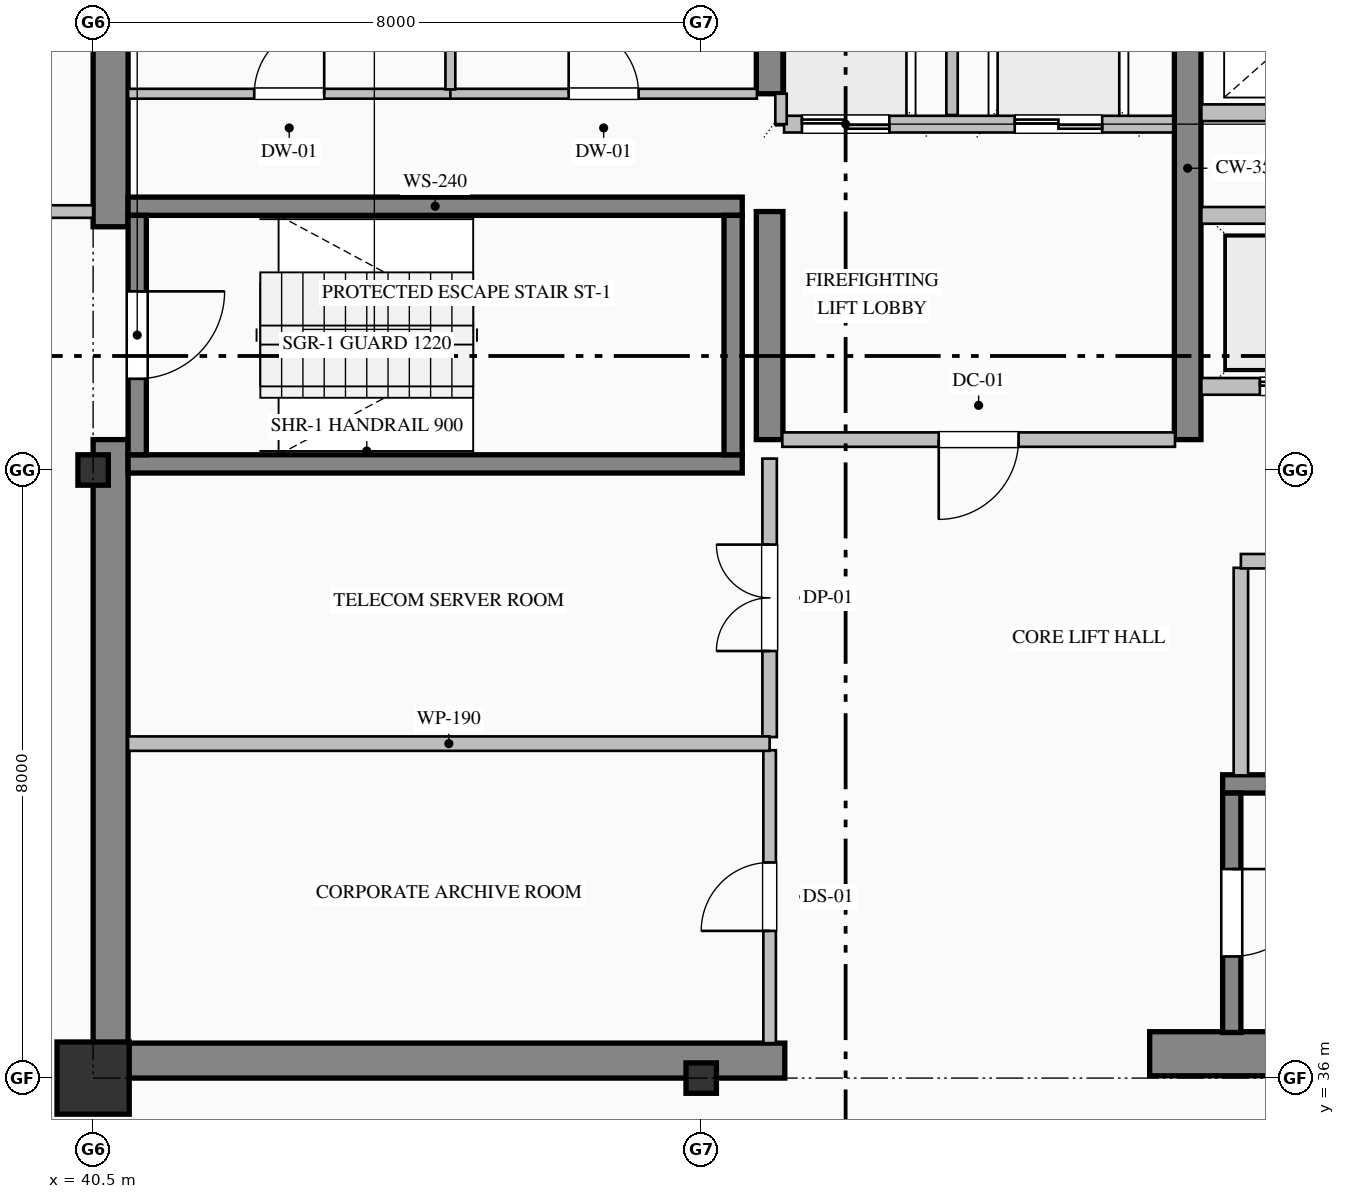
"""IFC4 building model, lengths in metres.
Left out: names, types, materials, properties, quantities, classifications, styles, units other than length and angle.
Written with IfcOpenShell. Run it as: python <this file> out.ifc"""

import sys

from ifc_helpers import new_model, si_unit, direction, frame, frame_2d, origin, origin_2d, place, context, subcontext, project, spatial, rectangle, hollow_rectangle, i_section, extrude, element, fill, save


model = new_model("IFC4")
c1 = context("Model", 3, precision=1e-05, world=origin(), true_north=direction((0.0, 1.0)))
c2 = subcontext(c1, "Body", "Model", "MODEL_VIEW")
j1 = project(units=[si_unit("LENGTHUNIT", "METRE"), si_unit("PLANEANGLEUNIT", "RADIAN")], contexts=[c1])
p1 = place(None, origin())
s1 = spatial("IfcSite", under=j1, at=p1, CompositionType="ELEMENT")
p2 = place(p1, origin())
s2 = spatial("IfcBuilding", under=s1, at=p2, CompositionType="ELEMENT")
p3 = place(p2, frame((0.0, 0.0, 249.8)))
s3 = spatial("IfcBuildingStorey", under=s2, at=p3, CompositionType="ELEMENT", Elevation=249.8)
p4 = place(p3, frame((40.73, 36.46, 0.0), z_axis=(0.0, 0.0, 1.0), x_axis=(0.0, 1.0, 0.0)))
e1 = element("IfcWall", 1, at=p4, inside=s3, PredefinedType="SHEAR", context=c2, shape_type="SweptSolid", body=[
    extrude(rectangle(XDim=7.94, YDim=0.46, at=frame_2d((3.97, 0.0))), origin(), (0.0, 0.0, 1.0), 3.775),
])
p5 = place(p3, frame((40.73, 47.2, 0.0), z_axis=(0.0, 0.0, 1.0), x_axis=(0.0, 1.0, 0.0)))
e2 = element("IfcWall", 2, at=p5, inside=s3, PredefinedType="SHEAR", context=c2, shape_type="SweptSolid", body=[
    extrude(rectangle(XDim=4.34, YDim=0.46, at=frame_2d((2.17, 0.0))), origin(), (0.0, 0.0, 1.0), 3.775),
])
p6 = place(p3, frame((40.5, 36.23, 0.0), z_axis=(0.0, 0.0, 1.0), x_axis=(1.0, 0.0, 0.0)))
e3 = element("IfcWall", 3, at=p6, inside=s3, PredefinedType="SHEAR", context=c2, shape_type="SweptSolid", body=[
    extrude(rectangle(XDim=9.1, YDim=0.46, at=frame_2d((4.55, 0.0))), origin(), (0.0, 0.0, 1.0), 3.775),
])
p7 = place(p3, frame((54.4, 36.32, 0.0), z_axis=(0.0, 0.0, 1.0), x_axis=(1.0, 0.0, 0.0)))
e4 = element("IfcWall", 4, at=p7, inside=s3, PredefinedType="SHEAR", context=c2, shape_type="SweptSolid", body=[
    extrude(rectangle(XDim=9.6, YDim=0.58, at=frame_2d((4.8, 0.0))), origin(), (0.0, 0.0, 1.0), 4.0),
])
p8 = place(p3, frame((49.4, 44.4, 0.0), z_axis=(0.0, 0.0, 1.0), x_axis=(0.0, 1.0, 0.0)))
e5 = element("IfcWall", 5, at=p8, inside=s3, PredefinedType="SHEAR", context=c2, shape_type="SweptSolid", body=[
    extrude(rectangle(XDim=3.0, YDim=0.35, at=frame_2d((1.5, 0.0))), origin(), (0.0, 0.0, 1.0), 3.775),
])
p9 = place(p3, frame((49.4, 48.95, 0.0), z_axis=(0.0, 0.0, 1.0), x_axis=(0.0, 1.0, 0.0)))
e6 = element("IfcWall", 6, at=p9, inside=s3, PredefinedType="SHEAR", context=c2, shape_type="SweptSolid", body=[
    extrude(rectangle(XDim=2.59, YDim=0.35, at=frame_2d((1.295, 0.0))), origin(), (0.0, 0.0, 1.0), 3.775),
])
p10 = place(p3, frame((54.9, 44.4, 0.0), z_axis=(0.0, 0.0, 1.0), x_axis=(0.0, 1.0, 0.0)))
e7 = element("IfcWall", 7, at=p10, inside=s3, PredefinedType="SHEAR", context=c2, shape_type="SweptSolid", body=[
    extrude(rectangle(XDim=7.14, YDim=0.35, at=frame_2d((3.57, 0.0))), origin(), (0.0, 0.0, 1.0), 3.775),
])
p11 = place(p3, frame((40.5, 36.0, 0.0), z_axis=(0.0, 0.0, 1.0), x_axis=(1.0, 0.0, 0.0)))
e8 = element("IfcColumn", 8, at=p11, inside=s3, PredefinedType="COLUMN", context=c2, shape_type="SweptSolid", body=[
    extrude(hollow_rectangle(XDim=0.95, YDim=0.95, WallThickness=0.036, at=origin_2d()), origin(), (0.0, 0.0, 1.0), 4.0),
])
for number, where, z_axis, x_axis in (
    (9, (40.5, 44.0, 0.0), (0.0, 0.0, 1.0), (1.0, 0.0, 0.0)),
    (10, (48.5, 36.0, 0.0), (0.0, 0.0, 1.0), (1.0, 0.0, 0.0)),
):
    element("IfcColumn", number, at=place(p3, frame(where, z_axis=z_axis, x_axis=x_axis)), inside=s3, PredefinedType="COLUMN", context=c2, shape_type="SweptSolid", body=[
        extrude(i_section(OverallWidth=0.4, OverallDepth=0.4, WebThickness=0.013, FlangeThickness=0.021, FilletRadius=0.022, at=origin_2d()), origin(), (0.0, 0.0, 1.0), 4.0),
    ])
for number, where, z_axis, x_axis in (
    (11, (40.96, 47.47, 0.0), (0.0, 0.0, 1.0), (1.0, 0.0, 0.0)),
    (12, (49.04, 44.08, 0.0), (0.0, 0.0, 1.0), (-1.0, 0.0, 0.0)),
):
    element("IfcWall", number, at=place(p3, frame(where, z_axis=z_axis, x_axis=x_axis)), inside=s3, PredefinedType="SOLIDWALL", context=c2, shape_type="SweptSolid", body=[
        extrude(rectangle(XDim=8.08, YDim=0.24, at=frame_2d((4.04, 0.0))), origin(), (0.0, 0.0, 1.0), 4.0),
    ])
p12 = place(p3, frame((41.08, 47.35, 0.0), z_axis=(0.0, 0.0, 1.0), x_axis=(0.0, -1.0, 0.0)))
e13 = element("IfcWall", 13, at=p12, inside=s3, PredefinedType="SOLIDWALL", context=c2, shape_type="SweptSolid", body=[
    extrude(rectangle(XDim=3.15, YDim=0.24, at=frame_2d((1.575, 0.0))), origin(), (0.0, 0.0, 1.0), 4.0),
])
p13 = place(p12, frame((1.0, 0.0, 0.0)))
e14 = element("IfcOpeningElement", 14, at=p13, cuts=e13, PredefinedType="OPENING", context=c2, shape_type="SweptSolid", body=[
    extrude(rectangle(XDim=1.15, YDim=2.2, at=frame_2d((0.575, 1.1))), frame((0.0, 0.13, 0.0), z_axis=(0.0, -1.0, 0.0), x_axis=(1.0, 0.0, 0.0)), (0.0, 0.0, 1.0), 0.26),
])
p14 = place(p3, frame((48.92, 44.2, 0.0), z_axis=(0.0, 0.0, 1.0), x_axis=(0.0, 1.0, 0.0)))
e15 = element("IfcWall", 15, at=p14, inside=s3, PredefinedType="SOLIDWALL", context=c2, shape_type="SweptSolid", body=[
    extrude(rectangle(XDim=3.15, YDim=0.24, at=frame_2d((1.575, 0.0))), origin(), (0.0, 0.0, 1.0), 4.0),
])
p15 = place(p3, frame((55.36, 39.87, 0.0), z_axis=(0.0, 0.0, 1.0), x_axis=(1.0, 0.0, 0.0)))
e16 = element("IfcWall", 16, at=p15, inside=s3, PredefinedType="SOLIDWALL", context=c2, shape_type="SweptSolid", body=[
    extrude(rectangle(XDim=8.08, YDim=0.24, at=frame_2d((4.04, 0.0))), origin(), (0.0, 0.0, 1.0), 4.0),
])
p16 = place(p3, frame((55.48, 39.75, 0.0), z_axis=(0.0, 0.0, 1.0), x_axis=(0.0, -1.0, 0.0)))
e17 = element("IfcWall", 17, at=p16, inside=s3, PredefinedType="SOLIDWALL", context=c2, shape_type="SweptSolid", body=[
    extrude(rectangle(XDim=3.15, YDim=0.24, at=frame_2d((1.575, 0.0))), origin(), (0.0, 0.0, 1.0), 4.0),
])
p17 = place(p16, frame((1.0, 0.0, 0.0)))
e18 = element("IfcOpeningElement", 18, at=p17, cuts=e17, PredefinedType="OPENING", context=c2, shape_type="SweptSolid", body=[
    extrude(rectangle(XDim=1.15, YDim=2.2, at=frame_2d((0.575, 1.1))), frame((0.0, 0.13, 0.0), z_axis=(0.0, -1.0, 0.0), x_axis=(1.0, 0.0, 0.0)), (0.0, 0.0, 1.0), 0.26),
])
p18 = place(p3, frame((54.71, 48.55, 0.0), z_axis=(0.0, 0.0, 1.0), x_axis=(-1.0, 0.0, 0.0)))
e19 = element("IfcWall", 19, at=p18, inside=s3, PredefinedType="PARTITIONING", context=c2, shape_type="SweptSolid", body=[
    extrude(rectangle(XDim=5.12, YDim=0.22, at=frame_2d((2.56, 0.0))), origin(), (0.0, 0.0, 1.0), 3.775),
])
p19 = place(p18, frame((3.735, 0.0, 0.0)))
e20 = element("IfcOpeningElement", 20, at=p19, cuts=e19, PredefinedType="OPENING", context=c2, shape_type="SweptSolid", body=[
    extrude(rectangle(XDim=1.15, YDim=2.2, at=frame_2d((0.575, 1.1))), frame((0.0, 0.12, 0.0), z_axis=(0.0, -1.0, 0.0), x_axis=(1.0, 0.0, 0.0)), (0.0, 0.0, 1.0), 0.24),
])
p20 = place(p18, frame((0.935, 0.0, 0.0)))
e21 = element("IfcOpeningElement", 21, at=p20, cuts=e19, PredefinedType="OPENING", context=c2, shape_type="SweptSolid", body=[
    extrude(rectangle(XDim=1.15, YDim=2.2, at=frame_2d((0.575, 1.1))), frame((0.0, 0.12, 0.0), z_axis=(0.0, -1.0, 0.0), x_axis=(1.0, 0.0, 0.0)), (0.0, 0.0, 1.0), 0.24),
])
p21 = place(p3, frame((51.8, 48.67, 0.0), z_axis=(0.0, 0.0, 1.0), x_axis=(0.0, 1.0, 0.0)))
e22 = element("IfcWall", 22, at=p21, inside=s3, PredefinedType="PARTITIONING", context=c2, shape_type="SweptSolid", body=[
    extrude(rectangle(XDim=2.87, YDim=0.15, at=frame_2d((1.435, 0.0))), origin(), (0.0, 0.0, 1.0), 3.775),
])
p22 = place(p3, frame((49.55, 48.55, 0.0), z_axis=(0.0, 0.0, 1.0), x_axis=(0.0, 1.0, 0.0)))
e23 = element("IfcWall", 23, at=p22, inside=s3, PredefinedType="PARTITIONING", context=c2, shape_type="SweptSolid", body=[
    extrude(rectangle(XDim=0.4, YDim=0.15, at=frame_2d((0.2, 0.0))), origin(), (0.0, 0.0, 1.0), 3.775),
])
p23 = place(p3, frame((63.32, 45.1, 0.0), z_axis=(0.0, 0.0, 1.0), x_axis=(-1.0, 0.0, 0.0)))
e24 = element("IfcWall", 24, at=p23, inside=s3, PredefinedType="PARTITIONING", context=c2, shape_type="SweptSolid", body=[
    extrude(rectangle(XDim=8.24, YDim=0.22, at=frame_2d((4.12, 0.0))), origin(), (0.0, 0.0, 1.0), 3.775),
])
p24 = place(p23, frame((6.37, 0.0, 0.0)))
e25 = element("IfcOpeningElement", 25, at=p24, cuts=e24, PredefinedType="OPENING", context=c2, shape_type="SweptSolid", body=[
    extrude(rectangle(XDim=1.1, YDim=2.2, at=frame_2d((0.55, 1.1))), frame((0.0, 0.12, 0.0), z_axis=(0.0, -1.0, 0.0), x_axis=(1.0, 0.0, 0.0)), (0.0, 0.0, 1.0), 0.24),
])
p25 = place(p23, frame((3.57, 0.0, 0.0)))
e26 = element("IfcOpeningElement", 26, at=p25, cuts=e24, PredefinedType="OPENING", context=c2, shape_type="SweptSolid", body=[
    extrude(rectangle(XDim=1.1, YDim=2.2, at=frame_2d((0.55, 1.1))), frame((0.0, 0.12, 0.0), z_axis=(0.0, -1.0, 0.0), x_axis=(1.0, 0.0, 0.0)), (0.0, 0.0, 1.0), 0.24),
])
p26 = place(p23, frame((0.77, 0.0, 0.0)))
e27 = element("IfcOpeningElement", 27, at=p26, cuts=e24, PredefinedType="OPENING", context=c2, shape_type="SweptSolid", body=[
    extrude(rectangle(XDim=1.1, YDim=2.2, at=frame_2d((0.55, 1.1))), frame((0.0, 0.12, 0.0), z_axis=(0.0, -1.0, 0.0), x_axis=(1.0, 0.0, 0.0)), (0.0, 0.0, 1.0), 0.24),
])
for number, where, z_axis, x_axis in (
    (28, (55.08, 47.35, 0.0), (0.0, 0.0, 1.0), (1.0, 0.0, 0.0)),
    (29, (63.32, 48.7, 0.0), (0.0, 0.0, 1.0), (-1.0, 0.0, 0.0)),
):
    element("IfcWall", number, at=place(p3, frame(where, z_axis=z_axis, x_axis=x_axis)), inside=s3, PredefinedType="PARTITIONING", context=c2, shape_type="SweptSolid", body=[
        extrude(rectangle(XDim=8.24, YDim=0.22, at=frame_2d((4.12, 0.0))), origin(), (0.0, 0.0, 1.0), 3.775),
    ])
p27 = place(p3, frame((37.8, 47.4, 0.0), z_axis=(0.0, 0.0, 1.0), x_axis=(1.0, 0.0, 0.0)))
e30 = element("IfcWall", 30, at=p27, inside=s3, PredefinedType="PARTITIONING", context=c2, shape_type="SweptSolid", body=[
    extrude(rectangle(XDim=2.7, YDim=0.165, at=frame_2d((1.35, 0.0))), origin(), (0.0, 0.0, 1.0), 3.775),
])
p28 = place(p27, frame((0.825, 0.0, 0.0)))
e31 = element("IfcOpeningElement", 31, at=p28, cuts=e30, PredefinedType="OPENING", context=c2, shape_type="SweptSolid", body=[
    extrude(rectangle(XDim=1.05, YDim=2.15, at=frame_2d((0.525, 1.075))), frame((0.0, 0.093, 0.0), z_axis=(0.0, -1.0, 0.0), x_axis=(1.0, 0.0, 0.0)), (0.0, 0.0, 1.0), 0.185),
])
p29 = place(p3, frame((40.96, 48.95, 0.0), z_axis=(0.0, 0.0, 1.0), x_axis=(1.0, 0.0, 0.0)))
e32 = element("IfcWall", 32, at=p29, inside=s3, PredefinedType="PARTITIONING", context=c2, shape_type="SweptSolid", body=[
    extrude(rectangle(XDim=4.24, YDim=0.13, at=frame_2d((2.12, 0.0))), origin(), (0.0, 0.0, 1.0), 3.775),
])
p30 = place(p29, frame((1.66, 0.0, 0.0)))
e33 = element("IfcOpeningElement", 33, at=p30, cuts=e32, PredefinedType="OPENING", context=c2, shape_type="SweptSolid", body=[
    extrude(rectangle(XDim=0.92, YDim=2.15, at=frame_2d((0.46, 1.075))), frame((0.0, 0.075, 0.0), z_axis=(0.0, -1.0, 0.0), x_axis=(1.0, 0.0, 0.0)), (0.0, 0.0, 1.0), 0.15),
])
p31 = place(p3, frame((45.2, 48.95, 0.0), z_axis=(0.0, 0.0, 1.0), x_axis=(1.0, 0.0, 0.0)))
e34 = element("IfcWall", 34, at=p31, inside=s3, PredefinedType="PARTITIONING", context=c2, shape_type="SweptSolid", body=[
    extrude(rectangle(XDim=4.033, YDim=0.13, at=frame_2d((2.017, 0.0))), origin(), (0.0, 0.0, 1.0), 3.775),
])
p32 = place(p31, frame((1.556, 0.0, 0.0)))
e35 = element("IfcOpeningElement", 35, at=p32, cuts=e34, PredefinedType="OPENING", context=c2, shape_type="SweptSolid", body=[
    extrude(rectangle(XDim=0.92, YDim=2.15, at=frame_2d((0.46, 1.075))), frame((0.0, 0.075, 0.0), z_axis=(0.0, -1.0, 0.0), x_axis=(1.0, 0.0, 0.0)), (0.0, 0.0, 1.0), 0.15),
])
p33 = place(p3, frame((54.733, 44.4, 0.0), z_axis=(0.0, 0.0, 1.0), x_axis=(-1.0, 0.0, 0.0)))
e36 = element("IfcWall", 36, at=p33, inside=s3, PredefinedType="PARTITIONING", context=c2, shape_type="SweptSolid", body=[
    extrude(rectangle(XDim=5.166, YDim=0.19, at=frame_2d((2.583, 0.0))), origin(), (0.0, 0.0, 1.0), 3.775),
])
p34 = place(p33, frame((2.058, 0.0, 0.0)))
e37 = element("IfcOpeningElement", 37, at=p34, cuts=e36, PredefinedType="OPENING", context=c2, shape_type="SweptSolid", body=[
    extrude(rectangle(XDim=1.05, YDim=2.15, at=frame_2d((0.525, 1.075))), frame((0.0, 0.105, 0.0), z_axis=(0.0, -1.0, 0.0), x_axis=(1.0, 0.0, 0.0)), (0.0, 0.0, 1.0), 0.21),
])
p35 = place(p3, frame((49.4, 36.46, 0.0), z_axis=(0.0, 0.0, 1.0), x_axis=(0.0, 1.0, 0.0)))
e38 = element("IfcWall", 38, at=p35, inside=s3, PredefinedType="PARTITIONING", context=c2, shape_type="SweptSolid", body=[
    extrude(rectangle(XDim=3.853, YDim=0.165, at=frame_2d((1.927, 0.0))), origin(), (0.0, 0.0, 1.0), 3.017),
])
p36 = place(p35, frame((1.477, 0.0, 0.0)))
e39 = element("IfcOpeningElement", 39, at=p36, cuts=e38, PredefinedType="OPENING", context=c2, shape_type="SweptSolid", body=[
    extrude(rectangle(XDim=0.9, YDim=2.15, at=frame_2d((0.45, 1.075))), frame((0.0, 0.093, 0.0), z_axis=(0.0, -1.0, 0.0), x_axis=(1.0, 0.0, 0.0)), (0.0, 0.0, 1.0), 0.185),
])
p37 = place(p3, frame((49.4, 40.487, 0.0), z_axis=(0.0, 0.0, 1.0), x_axis=(0.0, 1.0, 0.0)))
e40 = element("IfcWall", 40, at=p37, inside=s3, PredefinedType="PARTITIONING", context=c2, shape_type="SweptSolid", body=[
    extrude(rectangle(XDim=3.663, YDim=0.19, at=frame_2d((1.832, 0.0))), origin(), (0.0, 0.0, 1.0), 3.017),
])
p38 = place(p37, frame((1.132, 0.0, 0.0)))
e41 = element("IfcOpeningElement", 41, at=p38, cuts=e40, PredefinedType="OPENING", context=c2, shape_type="SweptSolid", body=[
    extrude(rectangle(XDim=1.4, YDim=2.25, at=frame_2d((0.7, 1.125))), frame((0.0, 0.105, 0.0), z_axis=(0.0, -1.0, 0.0), x_axis=(1.0, 0.0, 0.0)), (0.0, 0.0, 1.0), 0.21),
])
p39 = place(p3, frame((55.6, 42.713, 0.0), z_axis=(0.0, 0.0, 1.0), x_axis=(0.0, -1.0, 0.0)))
e42 = element("IfcWall", 42, at=p39, inside=s3, PredefinedType="PARTITIONING", context=c2, shape_type="SweptSolid", body=[
    extrude(rectangle(XDim=2.731, YDim=0.19, at=frame_2d((1.365, 0.0))), origin(), (0.0, 0.0, 1.0), 3.775),
])
p40 = place(p3, frame((40.96, 40.4, 0.0), z_axis=(0.0, 0.0, 1.0), x_axis=(1.0, 0.0, 0.0)))
e43 = element("IfcWall", 43, at=p40, inside=s3, PredefinedType="PARTITIONING", context=c2, shape_type="SweptSolid", body=[
    extrude(rectangle(XDim=8.44, YDim=0.19, at=frame_2d((4.22, 0.0))), origin(), (0.0, 0.0, 1.0), 3.775),
])
p41 = place(p3, frame((59.5, 42.8, 0.0), z_axis=(0.0, 0.0, 1.0), x_axis=(-1.0, 0.0, 0.0)))
e44 = element("IfcWall", 44, at=p41, inside=s3, PredefinedType="PARTITIONING", context=c2, shape_type="SweptSolid", body=[
    extrude(rectangle(XDim=3.9, YDim=0.19, at=frame_2d((1.95, 0.0))), origin(), (0.0, 0.0, 1.0), 3.775),
])
p42 = place(p41, frame((1.25, 0.0, 0.0)))
e45 = element("IfcOpeningElement", 45, at=p42, cuts=e44, PredefinedType="OPENING", context=c2, shape_type="SweptSolid", body=[
    extrude(rectangle(XDim=1.4, YDim=2.25, at=frame_2d((0.7, 1.125))), frame((0.0, 0.105, 0.0), z_axis=(0.0, -1.0, 0.0), x_axis=(1.0, 0.0, 0.0)), (0.0, 0.0, 1.0), 0.21),
])
p43 = place(p3, frame((45.2, 51.54, 0.0), z_axis=(0.0, 0.0, 1.0), x_axis=(0.0, -1.0, 0.0)))
e46 = element("IfcWall", 46, at=p43, inside=s3, PredefinedType="PARTITIONING", context=c2, shape_type="SweptSolid", body=[
    extrude(rectangle(XDim=2.533, YDim=0.13, at=frame_2d((1.267, 0.0))), origin(), (0.0, 0.0, 1.0), 3.775),
])
p44 = place(p13, origin())
e47 = element("IfcDoor", 47, at=p44, inside=s3, OperationType="SINGLE_SWING_LEFT", PredefinedType="DOOR", context=c2, shape_type="SweptSolid", body=[
    extrude(rectangle(XDim=1.15, YDim=2.2, at=frame_2d((0.575, 1.1))), frame((0.0, 0.025, 0.0), z_axis=(0.0, -1.0, 0.0), x_axis=(1.0, 0.0, 0.0)), (0.0, 0.0, 1.0), 0.05),
])
fill(e14, e47)
p45 = place(p17, origin())
e48 = element("IfcDoor", 48, at=p45, inside=s3, OperationType="SINGLE_SWING_LEFT", PredefinedType="DOOR", context=c2, shape_type="SweptSolid", body=[
    extrude(rectangle(XDim=1.15, YDim=2.2, at=frame_2d((0.575, 1.1))), frame((0.0, 0.025, 0.0), z_axis=(0.0, -1.0, 0.0), x_axis=(1.0, 0.0, 0.0)), (0.0, 0.0, 1.0), 0.05),
])
fill(e18, e48)
p46 = place(p19, origin())
e49 = element("IfcDoor", 49, at=p46, inside=s3, OperationType="DOUBLE_DOOR_SLIDING", PredefinedType="DOOR", context=c2, shape_type="SweptSolid", body=[
    extrude(rectangle(XDim=1.15, YDim=2.2, at=frame_2d((0.575, 1.1))), frame((0.0, 0.025, 0.0), z_axis=(0.0, -1.0, 0.0), x_axis=(1.0, 0.0, 0.0)), (0.0, 0.0, 1.0), 0.05),
])
fill(e20, e49)
p47 = place(p20, origin())
e50 = element("IfcDoor", 50, at=p47, inside=s3, OperationType="DOUBLE_DOOR_SLIDING", PredefinedType="DOOR", context=c2, shape_type="SweptSolid", body=[
    extrude(rectangle(XDim=1.15, YDim=2.2, at=frame_2d((0.575, 1.1))), frame((0.0, 0.025, 0.0), z_axis=(0.0, -1.0, 0.0), x_axis=(1.0, 0.0, 0.0)), (0.0, 0.0, 1.0), 0.05),
])
fill(e21, e50)
p48 = place(p24, origin())
e51 = element("IfcDoor", 51, at=p48, inside=s3, OperationType="DOUBLE_DOOR_SLIDING", PredefinedType="DOOR", context=c2, shape_type="SweptSolid", body=[
    extrude(rectangle(XDim=1.1, YDim=2.2, at=frame_2d((0.55, 1.1))), frame((0.0, 0.025, 0.0), z_axis=(0.0, -1.0, 0.0), x_axis=(1.0, 0.0, 0.0)), (0.0, 0.0, 1.0), 0.05),
])
fill(e25, e51)
p49 = place(p34, origin())
e52 = element("IfcDoor", 52, at=p49, inside=s3, OperationType="SINGLE_SWING_RIGHT", PredefinedType="DOOR", context=c2, shape_type="SweptSolid", body=[
    extrude(rectangle(XDim=1.05, YDim=2.15, at=frame_2d((0.525, 1.075))), frame((0.0, 0.025, 0.0), z_axis=(0.0, -1.0, 0.0), x_axis=(1.0, 0.0, 0.0)), (0.0, 0.0, 1.0), 0.05),
])
fill(e37, e52)
p50 = place(p36, origin())
e53 = element("IfcDoor", 53, at=p50, inside=s3, OperationType="SINGLE_SWING_LEFT", PredefinedType="DOOR", context=c2, shape_type="SweptSolid", body=[
    extrude(rectangle(XDim=0.9, YDim=2.15, at=frame_2d((0.45, 1.075))), frame((0.0, 0.025, 0.0), z_axis=(0.0, -1.0, 0.0), x_axis=(1.0, 0.0, 0.0)), (0.0, 0.0, 1.0), 0.05),
])
fill(e39, e53)
p51 = place(p38, origin())
e54 = element("IfcDoor", 54, at=p51, inside=s3, OperationType="DOUBLE_DOOR_SINGLE_SWING", PredefinedType="DOOR", context=c2, shape_type="SweptSolid", body=[
    extrude(rectangle(XDim=1.4, YDim=2.25, at=frame_2d((0.7, 1.125))), frame((0.0, 0.025, 0.0), z_axis=(0.0, -1.0, 0.0), x_axis=(1.0, 0.0, 0.0)), (0.0, 0.0, 1.0), 0.05),
])
fill(e41, e54)
p52 = place(p30, origin())
e55 = element("IfcDoor", 55, at=p52, inside=s3, OperationType="SINGLE_SWING_RIGHT", PredefinedType="DOOR", context=c2, shape_type="SweptSolid", body=[
    extrude(rectangle(XDim=0.92, YDim=2.15, at=frame_2d((0.46, 1.075))), frame((0.0, 0.025, 0.0), z_axis=(0.0, -1.0, 0.0), x_axis=(1.0, 0.0, 0.0)), (0.0, 0.0, 1.0), 0.05),
])
fill(e33, e55)
p53 = place(p32, origin())
e56 = element("IfcDoor", 56, at=p53, inside=s3, OperationType="SINGLE_SWING_LEFT", PredefinedType="DOOR", context=c2, shape_type="SweptSolid", body=[
    extrude(rectangle(XDim=0.92, YDim=2.15, at=frame_2d((0.46, 1.075))), frame((0.0, 0.025, 0.0), z_axis=(0.0, -1.0, 0.0), x_axis=(1.0, 0.0, 0.0)), (0.0, 0.0, 1.0), 0.05),
])
fill(e35, e56)
save(model, sys.argv[1])
